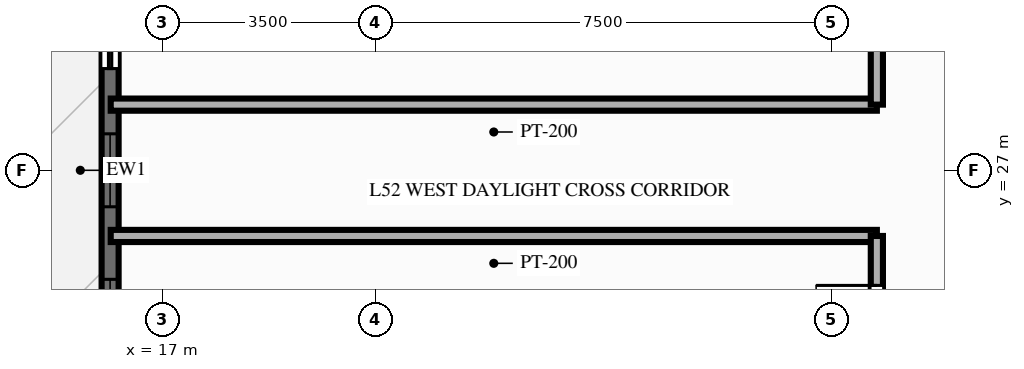
"""IFC4 building model, lengths in metres.
Left out: names, types, materials, properties, quantities, classifications, styles, units other than length and angle.
Written with IfcOpenShell. Run it as: python <this file> out.ifc"""

import sys

from ifc_helpers import new_model, si_unit, direction, frame, frame_2d, origin, place, context, subcontext, project, spatial, rectangle, extrude, source, transform, mapped, element, fill, save


model = new_model("IFC4")
c1 = context("Model", 3, precision=1e-05, world=origin(), true_north=direction((0.0, 1.0)))
c2 = subcontext(c1, "Body", "Model", "MODEL_VIEW")
j1 = project(units=[si_unit("LENGTHUNIT", "METRE"), si_unit("PLANEANGLEUNIT", "RADIAN")], contexts=[c1])
p1 = place(None, origin())
s1 = spatial("IfcSite", under=j1, at=p1, CompositionType="ELEMENT")
p2 = place(p1, origin())
s2 = spatial("IfcBuilding", under=s1, at=p2, CompositionType="ELEMENT")
p3 = place(p2, frame((0.0, 0.0, 166.0)))
s3 = spatial("IfcBuildingStorey", under=s2, at=p3, CompositionType="ELEMENT", Elevation=166.0)
p4 = place(p3, frame((16.14, 11.0, 0.0), z_axis=(0.0, 0.0, 1.0), x_axis=(0.0, 1.0, 0.0)))
e1 = element("IfcWall", 1, at=p4, inside=s3, PredefinedType="SOLIDWALL", context=c2, shape_type="SweptSolid", body=[
    extrude(rectangle(XDim=32.0, YDim=0.28, at=frame_2d((16.0, 0.0))), origin(), (0.0, 0.0, 1.0), 2.28),
])
p5 = place(p4, frame((1.001, 0.0, 0.25)))
e2 = element("IfcOpeningElement", 2, at=p5, cuts=e1, PredefinedType="OPENING", context=c2, shape_type="SweptSolid", body=[
    extrude(rectangle(XDim=1.2, YDim=1.5, at=frame_2d((0.6, 0.75))), frame((0.0, 0.152, 0.0), z_axis=(0.0, -1.0, 0.0), x_axis=(1.0, 0.0, 0.0)), (0.0, 0.0, 1.0), 0.304),
])
p6 = place(p4, frame((3.439, 0.0, 0.25)))
e3 = element("IfcOpeningElement", 3, at=p6, cuts=e1, PredefinedType="OPENING", context=c2, shape_type="SweptSolid", body=[
    extrude(rectangle(XDim=1.2, YDim=1.5, at=frame_2d((0.6, 0.75))), frame((0.0, 0.152, 0.0), z_axis=(0.0, -1.0, 0.0), x_axis=(1.0, 0.0, 0.0)), (0.0, 0.0, 1.0), 0.304),
])
p7 = place(p4, frame((5.588, 0.0, 0.25)))
e4 = element("IfcOpeningElement", 4, at=p7, cuts=e1, PredefinedType="OPENING", context=c2, shape_type="SweptSolid", body=[
    extrude(rectangle(XDim=0.7, YDim=1.5, at=frame_2d((0.35, 0.75))), frame((0.0, 0.152, 0.0), z_axis=(0.0, -1.0, 0.0), x_axis=(1.0, 0.0, 0.0)), (0.0, 0.0, 1.0), 0.304),
])
p8 = place(p4, frame((8.085, 0.0, 0.25)))
e5 = element("IfcOpeningElement", 5, at=p8, cuts=e1, PredefinedType="OPENING", context=c2, shape_type="SweptSolid", body=[
    extrude(rectangle(XDim=1.2, YDim=1.5, at=frame_2d((0.6, 0.75))), frame((0.0, 0.152, 0.0), z_axis=(0.0, -1.0, 0.0), x_axis=(1.0, 0.0, 0.0)), (0.0, 0.0, 1.0), 0.304),
])
p9 = place(p4, frame((10.575, 0.0, 0.25)))
e6 = element("IfcOpeningElement", 6, at=p9, cuts=e1, PredefinedType="OPENING", context=c2, shape_type="SweptSolid", body=[
    extrude(rectangle(XDim=1.2, YDim=1.5, at=frame_2d((0.6, 0.75))), frame((0.0, 0.152, 0.0), z_axis=(0.0, -1.0, 0.0), x_axis=(1.0, 0.0, 0.0)), (0.0, 0.0, 1.0), 0.304),
])
p10 = place(p4, frame((13.007, 0.0, 0.25)))
e7 = element("IfcOpeningElement", 7, at=p10, cuts=e1, PredefinedType="OPENING", context=c2, shape_type="SweptSolid", body=[
    extrude(rectangle(XDim=1.2, YDim=1.5, at=frame_2d((0.6, 0.75))), frame((0.0, 0.152, 0.0), z_axis=(0.0, -1.0, 0.0), x_axis=(1.0, 0.0, 0.0)), (0.0, 0.0, 1.0), 0.304),
])
p11 = place(p4, frame((15.4, 0.0, 0.25)))
e8 = element("IfcOpeningElement", 8, at=p11, cuts=e1, PredefinedType="OPENING", context=c2, shape_type="SweptSolid", body=[
    extrude(rectangle(XDim=1.2, YDim=1.5, at=frame_2d((0.6, 0.75))), frame((0.0, 0.152, 0.0), z_axis=(0.0, -1.0, 0.0), x_axis=(1.0, 0.0, 0.0)), (0.0, 0.0, 1.0), 0.304),
])
p12 = place(p4, frame((17.673, 0.0, 0.0)))
e9 = element("IfcOpeningElement", 9, at=p12, cuts=e1, PredefinedType="OPENING", context=c2, shape_type="SweptSolid", body=[
    extrude(rectangle(XDim=1.6, YDim=2.15, at=frame_2d((0.8, 1.075))), frame((0.0, 0.152, 0.0), z_axis=(0.0, -1.0, 0.0), x_axis=(1.0, 0.0, 0.0)), (0.0, 0.0, 1.0), 0.304),
])
p13 = place(p4, frame((20.452, 0.0, 0.25)))
e10 = element("IfcOpeningElement", 10, at=p13, cuts=e1, PredefinedType="OPENING", context=c2, shape_type="SweptSolid", body=[
    extrude(rectangle(XDim=1.2, YDim=1.5, at=frame_2d((0.6, 0.75))), frame((0.0, 0.152, 0.0), z_axis=(0.0, -1.0, 0.0), x_axis=(1.0, 0.0, 0.0)), (0.0, 0.0, 1.0), 0.304),
])
p14 = place(p4, frame((22.862, 0.0, 0.25)))
e11 = element("IfcOpeningElement", 11, at=p14, cuts=e1, PredefinedType="OPENING", context=c2, shape_type="SweptSolid", body=[
    extrude(rectangle(XDim=1.2, YDim=1.5, at=frame_2d((0.6, 0.75))), frame((0.0, 0.152, 0.0), z_axis=(0.0, -1.0, 0.0), x_axis=(1.0, 0.0, 0.0)), (0.0, 0.0, 1.0), 0.304),
])
p15 = place(p4, frame((25.734, 0.0, 0.25)))
e12 = element("IfcOpeningElement", 12, at=p15, cuts=e1, PredefinedType="OPENING", context=c2, shape_type="SweptSolid", body=[
    extrude(rectangle(XDim=0.95, YDim=1.5, at=frame_2d((0.475, 0.75))), frame((0.0, 0.152, 0.0), z_axis=(0.0, -1.0, 0.0), x_axis=(1.0, 0.0, 0.0)), (0.0, 0.0, 1.0), 0.304),
])
p16 = place(p4, frame((27.588, 0.0, 0.25)))
e13 = element("IfcOpeningElement", 13, at=p16, cuts=e1, PredefinedType="OPENING", context=c2, shape_type="SweptSolid", body=[
    extrude(rectangle(XDim=1.2, YDim=1.5, at=frame_2d((0.6, 0.75))), frame((0.0, 0.152, 0.0), z_axis=(0.0, -1.0, 0.0), x_axis=(1.0, 0.0, 0.0)), (0.0, 0.0, 1.0), 0.304),
])
p17 = place(p4, frame((29.879, 0.0, 0.25)))
e14 = element("IfcOpeningElement", 14, at=p17, cuts=e1, PredefinedType="OPENING", context=c2, shape_type="SweptSolid", body=[
    extrude(rectangle(XDim=1.2, YDim=1.5, at=frame_2d((0.6, 0.75))), frame((0.0, 0.152, 0.0), z_axis=(0.0, -1.0, 0.0), x_axis=(1.0, 0.0, 0.0)), (0.0, 0.0, 1.0), 0.304),
])
p18 = place(p3, frame((28.75, 25.92, 0.0), z_axis=(0.0, 0.0, 1.0), x_axis=(-1.0, 0.0, 0.0)))
e15 = element("IfcWall", 15, at=p18, inside=s3, PredefinedType="PARTITIONING", context=c2, shape_type="SweptSolid", body=[
    extrude(rectangle(XDim=12.6, YDim=0.2, at=frame_2d((6.3, 0.0))), origin(), (0.0, 0.0, 1.0), 2.79),
])
p19 = place(p3, frame((28.75, 23.293, 0.0), z_axis=(0.0, 0.0, 1.0), x_axis=(0.0, 1.0, 0.0)))
e16 = element("IfcWall", 16, at=p19, inside=s3, PredefinedType="PARTITIONING", context=c2, shape_type="SweptSolid", body=[
    extrude(rectangle(XDim=2.627, YDim=0.2, at=frame_2d((1.313, 0.0))), origin(), (0.0, 0.0, 1.0), 2.79),
])
p20 = place(p19, frame((0.813, 0.0, 0.0)))
e17 = element("IfcOpeningElement", 17, at=p20, cuts=e16, PredefinedType="OPENING", context=c2, shape_type="SweptSolid", body=[
    extrude(rectangle(XDim=1.0, YDim=2.15, at=frame_2d((0.5, 1.075))), frame((0.0, 0.112, 0.0), z_axis=(0.0, -1.0, 0.0), x_axis=(1.0, 0.0, 0.0)), (0.0, 0.0, 1.0), 0.224),
])
p21 = place(p3, frame((28.75, 28.08, 0.0), z_axis=(0.0, 0.0, 1.0), x_axis=(-1.0, 0.0, 0.0)))
e18 = element("IfcWall", 18, at=p21, inside=s3, PredefinedType="PARTITIONING", context=c2, shape_type="SweptSolid", body=[
    extrude(rectangle(XDim=12.6, YDim=0.2, at=frame_2d((6.3, 0.0))), origin(), (0.0, 0.0, 1.0), 2.79),
])
p22 = place(p3, frame((28.75, 28.08, 0.0), z_axis=(0.0, 0.0, 1.0), x_axis=(0.0, 1.0, 0.0)))
e19 = element("IfcWall", 19, at=p22, inside=s3, PredefinedType="PARTITIONING", context=c2, shape_type="SweptSolid", body=[
    extrude(rectangle(XDim=2.786, YDim=0.2, at=frame_2d((1.393, 0.0))), origin(), (0.0, 0.0, 1.0), 2.79),
])
p23 = place(p22, frame((0.893, 0.0, 0.0)))
e20 = element("IfcOpeningElement", 20, at=p23, cuts=e19, PredefinedType="OPENING", context=c2, shape_type="SweptSolid", body=[
    extrude(rectangle(XDim=1.0, YDim=2.15, at=frame_2d((0.5, 1.075))), frame((0.0, 0.112, 0.0), z_axis=(0.0, -1.0, 0.0), x_axis=(1.0, 0.0, 0.0)), (0.0, 0.0, 1.0), 0.224),
])
m1 = source(origin(), c2, "Body", "SweptSolid", [
    extrude(rectangle(XDim=1.2, YDim=1.5, at=frame_2d((0.6, 0.75))), frame((0.0, 0.03, 0.0), z_axis=(0.0, -1.0, 0.0), x_axis=(1.0, 0.0, 0.0)), (0.0, 0.0, 1.0), 0.06),
])
p24 = place(p10, origin())
e21 = element("IfcWindow", 21, at=p24, inside=s3, PartitioningType="SINGLE_PANEL", PredefinedType="WINDOW", context=c2, shape_type="MappedRepresentation", body=[
    mapped(m1, transform((0.0, 0.0, 0.0), scale=1.0)),
])
fill(e7, e21)
p25 = place(p11, origin())
e22 = element("IfcWindow", 22, at=p25, inside=s3, PartitioningType="SINGLE_PANEL", PredefinedType="WINDOW", context=c2, shape_type="MappedRepresentation", body=[
    mapped(m1, transform((0.0, 0.0, 0.0), scale=1.0)),
])
fill(e8, e22)
m2 = source(origin(), c2, "Body", "SweptSolid", [
    extrude(rectangle(XDim=1.6, YDim=2.15, at=frame_2d((0.8, 1.075))), frame((0.0, 0.025, 0.0), z_axis=(0.0, -1.0, 0.0), x_axis=(1.0, 0.0, 0.0)), (0.0, 0.0, 1.0), 0.05),
])
p26 = place(p12, origin())
e23 = element("IfcDoor", 23, at=p26, inside=s3, OperationType="SLIDING_TO_LEFT", PredefinedType="DOOR", context=c2, shape_type="MappedRepresentation", body=[
    mapped(m2, transform((0.0, 0.0, 0.0), scale=1.0)),
])
fill(e9, e23)
m3 = source(origin(), c2, "Body", "SweptSolid", [
    extrude(rectangle(XDim=1.0, YDim=2.15, at=frame_2d((0.5, 1.075))), frame((0.0, 0.025, 0.0), z_axis=(0.0, -1.0, 0.0), x_axis=(1.0, 0.0, 0.0)), (0.0, 0.0, 1.0), 0.05),
])
p27 = place(p20, origin())
e24 = element("IfcDoor", 24, at=p27, inside=s3, OperationType="SINGLE_SWING_RIGHT", PredefinedType="DOOR", context=c2, shape_type="MappedRepresentation", body=[
    mapped(m3, transform((0.0, 0.0, 0.0), scale=1.0)),
])
fill(e17, e24)
save(model, sys.argv[1])
